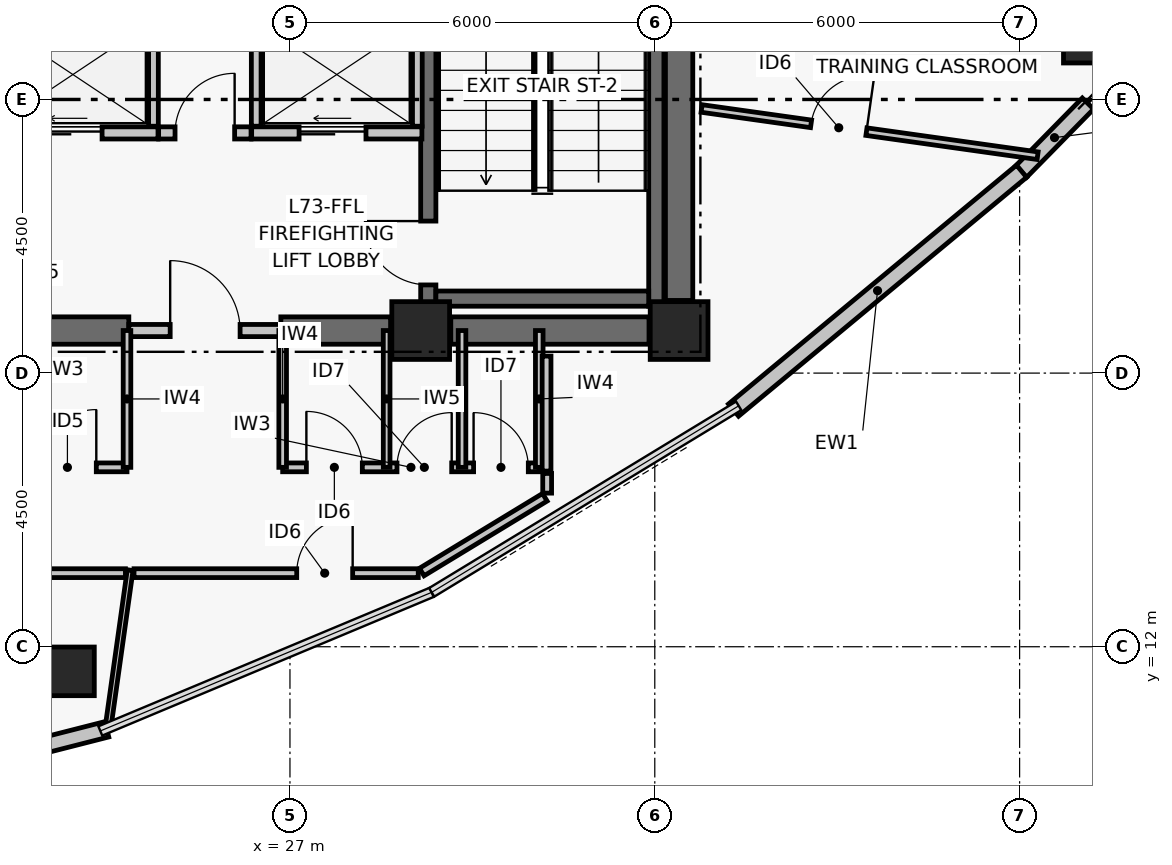
"""IFC4 building model, lengths in metres.
Left out: names, types, materials, properties, quantities, classifications, styles, units other than length and angle.
Written with IfcOpenShell. Run it as: python <this file> out.ifc"""

import sys

from ifc_helpers import new_model, si_unit, direction, frame, frame_2d, origin, origin_2d, place, context, subcontext, project, spatial, rectangle, hollow_rectangle, extrude, element, fill, save


model = new_model("IFC4")
c1 = context("Model", 3, precision=1e-05, world=origin(), true_north=direction((0.0, 1.0)))
c2 = subcontext(c1, "Body", "Model", "MODEL_VIEW")
j1 = project(units=[si_unit("LENGTHUNIT", "METRE"), si_unit("PLANEANGLEUNIT", "RADIAN")], contexts=[c1])
p1 = place(None, origin())
s1 = spatial("IfcSite", under=j1, at=p1, CompositionType="ELEMENT")
p2 = place(p1, origin())
s2 = spatial("IfcBuilding", under=s1, at=p2, CompositionType="ELEMENT")
p3 = place(p2, frame((0.0, 0.0, 288.06)))
s3 = spatial("IfcBuildingStorey", under=s2, at=p3, CompositionType="ELEMENT", Elevation=288.06)
for number, where, z_axis, x_axis in (
    (1, (29.15, 17.2, 0.0), (0.0, 0.0, 1.0), (1.0, 0.0, 0.0)),
    (2, (33.4, 17.2, 0.0), (0.0, 0.0, 1.0), (1.0, 0.0, 0.0)),
):
    element("IfcColumn", number, at=place(p3, frame(where, z_axis=z_axis, x_axis=x_axis)), inside=s3, PredefinedType="COLUMN", context=c2, shape_type="SweptSolid", body=[
        extrude(rectangle(XDim=0.95, YDim=0.95, at=origin_2d()), origin(), (0.0, 0.0, 1.0), 3.72),
    ])
p4 = place(p3, frame((22.545, 17.2, 0.0), z_axis=(0.0, 0.0, 1.0), x_axis=(1.0, 0.0, 0.0)))
e3 = element("IfcWall", 3, at=p4, inside=s3, PredefinedType="SHEAR", context=c2, shape_type="SweptSolid", body=[
    extrude(rectangle(XDim=1.805, YDim=0.45, at=frame_2d((0.903, 0.0))), origin(), (0.0, 0.0, 1.0), 3.5),
])
p5 = place(p3, frame((26.85, 17.2, 0.0), z_axis=(0.0, 0.0, 1.0), x_axis=(1.0, 0.0, 0.0)))
e4 = element("IfcWall", 4, at=p5, inside=s3, PredefinedType="SHEAR", context=c2, shape_type="SweptSolid", body=[
    extrude(rectangle(XDim=1.805, YDim=0.45, at=frame_2d((0.902, 0.0))), origin(), (0.0, 0.0, 1.0), 3.5),
])
p6 = place(p3, frame((29.645, 17.2, 0.0), z_axis=(0.0, 0.0, 1.0), x_axis=(1.0, 0.0, 0.0)))
e5 = element("IfcWall", 5, at=p6, inside=s3, PredefinedType="SHEAR", context=c2, shape_type="SweptSolid", body=[
    extrude(rectangle(XDim=3.26, YDim=0.45, at=frame_2d((1.63, 0.0))), origin(), (0.0, 0.0, 1.0), 3.5),
])
p7 = place(p3, frame((33.4, 17.695, 0.0), z_axis=(0.0, 0.0, 1.0), x_axis=(0.0, 1.0, 0.0)))
e6 = element("IfcWall", 6, at=p7, inside=s3, PredefinedType="SHEAR", context=c2, shape_type="SweptSolid", body=[
    extrude(rectangle(XDim=8.61, YDim=0.45, at=frame_2d((4.305, 0.0))), origin(), (0.0, 0.0, 1.0), 3.5),
])
p8 = place(p3, frame((29.275, 17.6, 0.0), z_axis=(0.0, 0.0, 1.0), x_axis=(0.0, 1.0, 0.0)))
e7 = element("IfcWall", 7, at=p8, inside=s3, PredefinedType="SHEAR", context=c2, shape_type="SweptSolid", body=[
    extrude(rectangle(XDim=8.8, YDim=0.25, at=frame_2d((4.4, 0.0))), origin(), (0.0, 0.0, 1.0), 3.5),
])
p9 = place(p8, frame((0.35, 0.0, 0.0)))
e8 = element("IfcOpeningElement", 8, at=p9, cuts=e7, PredefinedType="OPENING", context=c2, shape_type="SweptSolid", body=[
    extrude(rectangle(XDim=1.05, YDim=2.08, at=frame_2d((0.525, 1.04))), frame((0.0, 0.135, 0.0), z_axis=(0.0, -1.0, 0.0), x_axis=(1.0, 0.0, 0.0)), (0.0, 0.0, 1.0), 0.27),
])
p10 = place(p3, frame((33.025, 17.6, 0.0), z_axis=(0.0, 0.0, 1.0), x_axis=(0.0, 1.0, 0.0)))
e9 = element("IfcWall", 9, at=p10, inside=s3, PredefinedType="SHEAR", context=c2, shape_type="SweptSolid", body=[
    extrude(rectangle(XDim=8.8, YDim=0.25, at=frame_2d((4.4, 0.0))), origin(), (0.0, 0.0, 1.0), 3.5),
])
p11 = place(p3, frame((29.4, 17.725, 0.0), z_axis=(0.0, 0.0, 1.0), x_axis=(1.0, 0.0, 0.0)))
e10 = element("IfcWall", 10, at=p11, inside=s3, PredefinedType="SHEAR", context=c2, shape_type="SweptSolid", body=[
    extrude(rectangle(XDim=3.5, YDim=0.25, at=frame_2d((1.75, 0.0))), origin(), (0.0, 0.0, 1.0), 3.5),
])
for number, where, z_axis, x_axis in (
    (11, (40.122, 22.0, 0.0), (0.0, 0.0, 1.0), (1.0, 0.0, 0.0)),
    (12, (23.382, 11.595, 0.0), (0.0, 0.0, 1.0), (1.0, 0.0, 0.0)),
):
    element("IfcColumn", number, at=place(p3, frame(where, z_axis=z_axis, x_axis=x_axis)), inside=s3, PredefinedType="COLUMN", context=c2, shape_type="SweptSolid", body=[
        extrude(hollow_rectangle(XDim=0.8, YDim=0.8, WallThickness=0.035, at=origin_2d()), origin(), (0.0, 0.0, 1.0), 3.72),
    ])
p12 = place(p3, frame((40.124, 20.933, 0.0), z_axis=(0.0, 0.0, 1.0), x_axis=(-0.700470648387, -0.71368121087, 0.0)))
e13 = element("IfcWall", 13, at=p12, inside=s3, PredefinedType="PARTITIONING", context=c2, shape_type="SweptSolid", body=[
    extrude(rectangle(XDim=1.571, YDim=0.26, at=frame_2d((0.785, 0.0))), origin(), (0.0, 0.0, 1.0), 3.5),
])
p13 = place(p3, frame((23.988, 10.642, 0.0), z_axis=(0.0, 0.0, 1.0), x_axis=(-0.968988278672, -0.247106689096, 0.0)))
e14 = element("IfcWall", 14, at=p13, inside=s3, PredefinedType="PARTITIONING", context=c2, shape_type="SweptSolid", body=[
    extrude(rectangle(XDim=6.154, YDim=0.26, at=frame_2d((3.077, 0.0))), origin(), (0.0, 0.0, 1.0), 3.5),
])
p14 = place(p3, frame((39.032, 19.82, 0.0), z_axis=(0.0, 0.0, 1.0), x_axis=(-0.769779830138, -0.638309496337, 0.0)))
e15 = element("IfcWall", 15, at=p14, inside=s3, PredefinedType="PARTITIONING", context=c2, shape_type="SweptSolid", body=[
    extrude(rectangle(XDim=6.154, YDim=0.26, at=frame_2d((3.077, 0.0))), origin(), (0.0, 0.0, 1.0), 3.5),
])
p15 = place(p3, frame((24.35, 17.2, 0.0), z_axis=(0.0, 0.0, 1.0), x_axis=(1.0, 0.0, 0.0)))
e16 = element("IfcWall", 16, at=p15, inside=s3, PredefinedType="PARTITIONING", context=c2, shape_type="SweptSolid", body=[
    extrude(rectangle(XDim=2.5, YDim=0.2, at=frame_2d((1.25, 0.0))), origin(), (0.0, 0.0, 1.0), 2.63),
])
p16 = place(p15, frame((0.68, 0.0, 0.0)))
e17 = element("IfcOpeningElement", 17, at=p16, cuts=e16, PredefinedType="OPENING", context=c2, shape_type="SweptSolid", body=[
    extrude(rectangle(XDim=1.15, YDim=2.08, at=frame_2d((0.575, 1.04))), frame((0.0, 0.11, 0.0), z_axis=(0.0, -1.0, 0.0), x_axis=(1.0, 0.0, 0.0)), (0.0, 0.0, 1.0), 0.22),
])
p17 = place(p3, frame((24.84, 20.45, 0.0), z_axis=(0.0, 0.0, 1.0), x_axis=(1.0, 0.0, 0.0)))
e18 = element("IfcWall", 18, at=p17, inside=s3, PredefinedType="PARTITIONING", context=c2, shape_type="SweptSolid", body=[
    extrude(rectangle(XDim=1.52, YDim=0.2, at=frame_2d((0.76, 0.0))), origin(), (0.0, 0.0, 1.0), 3.5),
])
p18 = place(p17, frame((0.27, 0.0, 0.0)))
e19 = element("IfcOpeningElement", 19, at=p18, cuts=e18, PredefinedType="OPENING", context=c2, shape_type="SweptSolid", body=[
    extrude(rectangle(XDim=0.98, YDim=2.06, at=frame_2d((0.49, 1.03))), frame((0.0, 0.11, 0.0), z_axis=(0.0, -1.0, 0.0), x_axis=(1.0, 0.0, 0.0)), (0.0, 0.0, 1.0), 0.22),
])
p19 = place(p3, frame((22.03, 20.45, 0.0), z_axis=(0.0, 0.0, 1.0), x_axis=(1.0, 0.0, 0.0)))
e20 = element("IfcWall", 20, at=p19, inside=s3, PredefinedType="PARTITIONING", context=c2, shape_type="SweptSolid", body=[
    extrude(rectangle(XDim=2.8, YDim=0.2, at=frame_2d((1.4, 0.0))), origin(), (0.0, 0.0, 1.0), 3.5),
])
p20 = place(p19, frame((0.78, 0.0, 0.0)))
e21 = element("IfcOpeningElement", 21, at=p20, cuts=e20, PredefinedType="OPENING", context=c2, shape_type="SweptSolid", body=[
    extrude(rectangle(XDim=1.1, YDim=2.08, at=frame_2d((0.55, 1.04))), frame((0.0, 0.11, 0.0), z_axis=(0.0, -1.0, 0.0), x_axis=(1.0, 0.0, 0.0)), (0.0, 0.0, 1.0), 0.22),
])
p21 = place(p3, frame((26.37, 20.45, 0.0), z_axis=(0.0, 0.0, 1.0), x_axis=(1.0, 0.0, 0.0)))
e22 = element("IfcWall", 22, at=p21, inside=s3, PredefinedType="PARTITIONING", context=c2, shape_type="SweptSolid", body=[
    extrude(rectangle(XDim=2.8, YDim=0.2, at=frame_2d((1.4, 0.0))), origin(), (0.0, 0.0, 1.0), 3.5),
])
p22 = place(p21, frame((0.78, 0.0, 0.0)))
e23 = element("IfcOpeningElement", 23, at=p22, cuts=e22, PredefinedType="OPENING", context=c2, shape_type="SweptSolid", body=[
    extrude(rectangle(XDim=1.1, YDim=2.08, at=frame_2d((0.55, 1.04))), frame((0.0, 0.11, 0.0), z_axis=(0.0, -1.0, 0.0), x_axis=(1.0, 0.0, 0.0)), (0.0, 0.0, 1.0), 0.22),
])
p23 = place(p3, frame((24.755, 20.56, 0.0), z_axis=(0.0, 0.0, 1.0), x_axis=(0.0, 1.0, 0.0)))
e24 = element("IfcWall", 24, at=p23, inside=s3, PredefinedType="PARTITIONING", context=c2, shape_type="SweptSolid", body=[
    extrude(rectangle(XDim=1.71, YDim=0.16, at=frame_2d((0.855, 0.0))), origin(), (0.0, 0.0, 1.0), 3.5),
])
p24 = place(p3, frame((29.095, 20.56, 0.0), z_axis=(0.0, 0.0, 1.0), x_axis=(0.0, 1.0, 0.0)))
e25 = element("IfcWall", 25, at=p24, inside=s3, PredefinedType="PARTITIONING", context=c2, shape_type="SweptSolid", body=[
    extrude(rectangle(XDim=3.58, YDim=0.16, at=frame_2d((1.79, 0.0))), origin(), (0.0, 0.0, 1.0), 3.5),
])
p25 = place(p3, frame((26.445, 20.56, 0.0), z_axis=(0.0, 0.0, 1.0), x_axis=(0.0, 1.0, 0.0)))
e26 = element("IfcWall", 26, at=p25, inside=s3, PredefinedType="PARTITIONING", context=c2, shape_type="SweptSolid", body=[
    extrude(rectangle(XDim=1.71, YDim=0.16, at=frame_2d((0.855, 0.0))), origin(), (0.0, 0.0, 1.0), 3.5),
])
p26 = place(p3, frame((19.1, 14.95, 0.0), z_axis=(0.0, 0.0, 1.0), x_axis=(1.0, 0.0, 0.0)))
e27 = element("IfcWall", 27, at=p26, inside=s3, PredefinedType="PARTITIONING", context=c2, shape_type="SweptSolid", body=[
    extrude(rectangle(XDim=5.22, YDim=0.145, at=frame_2d((2.61, 0.0))), origin(), (0.0, 0.0, 1.0), 2.83),
])
p27 = place(p26, frame((0.2, 0.0, 0.0)))
e28 = element("IfcOpeningElement", 28, at=p27, cuts=e27, PredefinedType="OPENING", context=c2, shape_type="SweptSolid", body=[
    extrude(rectangle(XDim=0.9, YDim=2.02, at=frame_2d((0.45, 1.01))), frame((0.0, 0.083, 0.0), z_axis=(0.0, -1.0, 0.0), x_axis=(1.0, 0.0, 0.0)), (0.0, 0.0, 1.0), 0.165),
])
p28 = place(p26, frame((1.805, 0.0, 0.0)))
e29 = element("IfcOpeningElement", 29, at=p28, cuts=e27, PredefinedType="OPENING", context=c2, shape_type="SweptSolid", body=[
    extrude(rectangle(XDim=0.95, YDim=2.06, at=frame_2d((0.475, 1.03))), frame((0.0, 0.083, 0.0), z_axis=(0.0, -1.0, 0.0), x_axis=(1.0, 0.0, 0.0)), (0.0, 0.0, 1.0), 0.165),
])
p29 = place(p26, frame((3.765, 0.0, 0.0)))
e30 = element("IfcOpeningElement", 30, at=p29, cuts=e27, PredefinedType="OPENING", context=c2, shape_type="SweptSolid", body=[
    extrude(rectangle(XDim=0.95, YDim=2.06, at=frame_2d((0.475, 1.03))), frame((0.0, 0.083, 0.0), z_axis=(0.0, -1.0, 0.0), x_axis=(1.0, 0.0, 0.0)), (0.0, 0.0, 1.0), 0.165),
])
p30 = place(p3, frame((26.88, 14.95, 0.0), z_axis=(0.0, 0.0, 1.0), x_axis=(1.0, 0.0, 0.0)))
e31 = element("IfcWall", 31, at=p30, inside=s3, PredefinedType="PARTITIONING", context=c2, shape_type="SweptSolid", body=[
    extrude(rectangle(XDim=4.22, YDim=0.145, at=frame_2d((2.11, 0.0))), origin(), (0.0, 0.0, 1.0), 2.98),
])
p31 = place(p30, frame((0.39, 0.0, 0.0)))
e32 = element("IfcOpeningElement", 32, at=p31, cuts=e31, PredefinedType="OPENING", context=c2, shape_type="SweptSolid", body=[
    extrude(rectangle(XDim=0.92, YDim=2.05, at=frame_2d((0.46, 1.025))), frame((0.0, 0.083, 0.0), z_axis=(0.0, -1.0, 0.0), x_axis=(1.0, 0.0, 0.0)), (0.0, 0.0, 1.0), 0.165),
])
p32 = place(p30, frame((1.88, 0.0, 0.0)))
e33 = element("IfcOpeningElement", 33, at=p32, cuts=e31, PredefinedType="OPENING", context=c2, shape_type="SweptSolid", body=[
    extrude(rectangle(XDim=0.9, YDim=2.02, at=frame_2d((0.45, 1.01))), frame((0.0, 0.083, 0.0), z_axis=(0.0, -1.0, 0.0), x_axis=(1.0, 0.0, 0.0)), (0.0, 0.0, 1.0), 0.165),
])
p33 = place(p30, frame((3.14, 0.0, 0.0)))
e34 = element("IfcOpeningElement", 34, at=p33, cuts=e31, PredefinedType="OPENING", context=c2, shape_type="SweptSolid", body=[
    extrude(rectangle(XDim=0.9, YDim=2.02, at=frame_2d((0.45, 1.01))), frame((0.0, 0.083, 0.0), z_axis=(0.0, -1.0, 0.0), x_axis=(1.0, 0.0, 0.0)), (0.0, 0.0, 1.0), 0.165),
])
for number, where, z_axis, x_axis in (
    (35, (24.32, 14.95, 0.0), (0.0, 0.0, 1.0), (0.0, 1.0, 0.0)),
    (36, (26.88, 14.95, 0.0), (0.0, 0.0, 1.0), (0.0, 1.0, 0.0)),
):
    element("IfcWall", number, at=place(p3, frame(where, z_axis=z_axis, x_axis=x_axis)), inside=s3, PredefinedType="PARTITIONING", context=c2, shape_type="SweptSolid", body=[
        extrude(rectangle(XDim=2.25, YDim=0.125, at=frame_2d((1.125, 0.0))), origin(), (0.0, 0.0, 1.0), 2.63),
    ])
p34 = place(p3, frame((28.59, 14.95, 0.0), z_axis=(0.0, 0.0, 1.0), x_axis=(0.0, 1.0, 0.0)))
e37 = element("IfcWall", 37, at=p34, inside=s3, PredefinedType="PARTITIONING", context=c2, shape_type="SweptSolid", body=[
    extrude(rectangle(XDim=2.25, YDim=0.11, at=frame_2d((1.125, 0.0))), origin(), (0.0, 0.0, 1.0), 2.63),
])
for number, where, z_axis, x_axis in (
    (38, (29.83, 14.95, 0.0), (0.0, 0.0, 1.0), (0.0, 1.0, 0.0)),
    (39, (31.1, 14.95, 0.0), (0.0, 0.0, 1.0), (0.0, 1.0, 0.0)),
):
    element("IfcWall", number, at=place(p3, frame(where, z_axis=z_axis, x_axis=x_axis)), inside=s3, PredefinedType="PARTITIONING", context=c2, shape_type="SweptSolid", body=[
        extrude(rectangle(XDim=2.25, YDim=0.125, at=frame_2d((1.125, 0.0))), origin(), (0.0, 0.0, 1.0), 2.63),
    ])
p35 = place(p3, frame((17.54, 13.21, 0.0), z_axis=(0.0, 0.0, 1.0), x_axis=(1.0, 0.0, 0.0)))
e40 = element("IfcWall", 40, at=p35, inside=s3, PredefinedType="PARTITIONING", context=c2, shape_type="SweptSolid", body=[
    extrude(rectangle(XDim=6.754, YDim=0.145, at=frame_2d((3.377, 0.0))), origin(), (0.0, 0.0, 1.0), 2.83),
])
p36 = place(p35, frame((0.936, 0.0, 0.0)))
e41 = element("IfcOpeningElement", 41, at=p36, cuts=e40, PredefinedType="OPENING", context=c2, shape_type="SweptSolid", body=[
    extrude(rectangle(XDim=0.95, YDim=2.06, at=frame_2d((0.475, 1.03))), frame((0.0, 0.083, 0.0), z_axis=(0.0, -1.0, 0.0), x_axis=(1.0, 0.0, 0.0)), (0.0, 0.0, 1.0), 0.165),
])
p37 = place(p3, frame((24.435, 13.21, 0.0), z_axis=(0.0, 0.0, 1.0), x_axis=(1.0, 0.0, 0.0)))
e42 = element("IfcWall", 42, at=p37, inside=s3, PredefinedType="PARTITIONING", context=c2, shape_type="SweptSolid", body=[
    extrude(rectangle(XDim=4.675, YDim=0.145, at=frame_2d((2.337, 0.0))), origin(), (0.0, 0.0, 1.0), 2.98),
])
p38 = place(p37, frame((2.676, 0.0, 0.0)))
e43 = element("IfcOpeningElement", 43, at=p38, cuts=e42, PredefinedType="OPENING", context=c2, shape_type="SweptSolid", body=[
    extrude(rectangle(XDim=0.92, YDim=2.05, at=frame_2d((0.46, 1.025))), frame((0.0, 0.083, 0.0), z_axis=(0.0, -1.0, 0.0), x_axis=(1.0, 0.0, 0.0)), (0.0, 0.0, 1.0), 0.165),
])
p39 = place(p3, frame((29.168, 13.229, 0.0), z_axis=(0.0, 0.0, 1.0), x_axis=(0.854678044033, 0.519158396876, 0.0)))
e44 = element("IfcWall", 44, at=p39, inside=s3, PredefinedType="PARTITIONING", context=c2, shape_type="SweptSolid", body=[
    extrude(rectangle(XDim=2.368, YDim=0.145, at=frame_2d((1.184, 0.0))), origin(), (0.0, 0.0, 1.0), 3.5),
])
p40 = place(p3, frame((31.23, 14.526, 0.0), z_axis=(0.0, 0.0, 1.0), x_axis=(0.0, 1.0, 0.0)))
e45 = element("IfcWall", 45, at=p40, inside=s3, PredefinedType="PARTITIONING", context=c2, shape_type="SweptSolid", body=[
    extrude(rectangle(XDim=0.324, YDim=0.145, at=frame_2d((0.162, 0.0))), origin(), (0.0, 0.0, 1.0), 3.5),
])
p41 = place(p3, frame((31.22, 14.889, 0.0), z_axis=(0.0, 0.0, 1.0), x_axis=(0.0, 1.0, 0.0)))
e46 = element("IfcWall", 46, at=p41, inside=s3, PredefinedType="PARTITIONING", context=c2, shape_type="SweptSolid", body=[
    extrude(rectangle(XDim=1.891, YDim=0.145, at=frame_2d((0.946, 0.0))), origin(), (0.0, 0.0, 1.0), 2.63),
])
p42 = place(p3, frame((24.372, 13.26, 0.0), z_axis=(0.0, 0.0, 1.0), x_axis=(-0.139185119823, -0.990266379526, 0.0)))
e47 = element("IfcWall", 47, at=p42, inside=s3, PredefinedType="PARTITIONING", context=c2, shape_type="SweptSolid", body=[
    extrude(rectangle(XDim=2.629, YDim=0.095, at=frame_2d((1.315, 0.0))), origin(), (0.0, 0.0, 1.0), 2.98),
])
p43 = place(p3, frame((33.77, 20.852, 0.0), z_axis=(0.0, 0.0, 1.0), x_axis=(0.990268923666, -0.139167017724, 0.0)))
e48 = element("IfcWall", 48, at=p43, inside=s3, PredefinedType="PARTITIONING", context=c2, shape_type="SweptSolid", body=[
    extrude(rectangle(XDim=5.58, YDim=0.125, at=frame_2d((2.79, 0.0))), origin(), (0.0, 0.0, 1.0), 2.63),
])
p44 = place(p43, frame((1.818, 0.0, 0.0)))
e49 = element("IfcOpeningElement", 49, at=p44, cuts=e48, PredefinedType="OPENING", context=c2, shape_type="SweptSolid", body=[
    extrude(rectangle(XDim=0.92, YDim=2.05, at=frame_2d((0.46, 1.025))), frame((0.0, 0.073, 0.0), z_axis=(0.0, -1.0, 0.0), x_axis=(1.0, 0.0, 0.0)), (0.0, 0.0, 1.0), 0.145),
])
p45 = place(p9, origin())
e50 = element("IfcDoor", 50, at=p45, inside=s3, OperationType="SINGLE_SWING_RIGHT", PredefinedType="DOOR", context=c2, shape_type="SweptSolid", body=[
    extrude(rectangle(XDim=1.05, YDim=2.08, at=frame_2d((0.525, 1.04))), frame((0.0, 0.025, 0.0), z_axis=(0.0, -1.0, 0.0), x_axis=(1.0, 0.0, 0.0)), (0.0, 0.0, 1.0), 0.05),
])
fill(e8, e50)
p46 = place(p16, origin())
e51 = element("IfcDoor", 51, at=p46, inside=s3, OperationType="SINGLE_SWING_LEFT", PredefinedType="DOOR", context=c2, shape_type="SweptSolid", body=[
    extrude(rectangle(XDim=1.15, YDim=2.08, at=frame_2d((0.575, 1.04))), frame((0.0, 0.025, 0.0), z_axis=(0.0, -1.0, 0.0), x_axis=(1.0, 0.0, 0.0)), (0.0, 0.0, 1.0), 0.05),
])
fill(e17, e51)
p47 = place(p18, origin())
e52 = element("IfcDoor", 52, at=p47, inside=s3, OperationType="SINGLE_SWING_RIGHT", PredefinedType="DOOR", context=c2, shape_type="SweptSolid", body=[
    extrude(rectangle(XDim=0.98, YDim=2.06, at=frame_2d((0.49, 1.03))), frame((0.0, 0.025, 0.0), z_axis=(0.0, -1.0, 0.0), x_axis=(1.0, 0.0, 0.0)), (0.0, 0.0, 1.0), 0.05),
])
fill(e19, e52)
p48 = place(p20, origin())
e53 = element("IfcDoor", 53, at=p48, inside=s3, OperationType="DOUBLE_DOOR_SLIDING", PredefinedType="DOOR", context=c2, shape_type="SweptSolid", body=[
    extrude(rectangle(XDim=1.1, YDim=2.08, at=frame_2d((0.55, 1.04))), frame((0.0, 0.025, 0.0), z_axis=(0.0, -1.0, 0.0), x_axis=(1.0, 0.0, 0.0)), (0.0, 0.0, 1.0), 0.05),
])
fill(e21, e53)
p49 = place(p22, origin())
e54 = element("IfcDoor", 54, at=p49, inside=s3, OperationType="DOUBLE_DOOR_SLIDING", PredefinedType="DOOR", context=c2, shape_type="SweptSolid", body=[
    extrude(rectangle(XDim=1.1, YDim=2.08, at=frame_2d((0.55, 1.04))), frame((0.0, 0.025, 0.0), z_axis=(0.0, -1.0, 0.0), x_axis=(1.0, 0.0, 0.0)), (0.0, 0.0, 1.0), 0.05),
])
fill(e23, e54)
p50 = place(p29, origin())
e55 = element("IfcDoor", 55, at=p50, inside=s3, OperationType="SINGLE_SWING_RIGHT", PredefinedType="DOOR", context=c2, shape_type="SweptSolid", body=[
    extrude(rectangle(XDim=0.95, YDim=2.06, at=frame_2d((0.475, 1.03))), frame((0.0, 0.025, 0.0), z_axis=(0.0, -1.0, 0.0), x_axis=(1.0, 0.0, 0.0)), (0.0, 0.0, 1.0), 0.05),
])
fill(e30, e55)
p51 = place(p31, origin())
e56 = element("IfcDoor", 56, at=p51, inside=s3, OperationType="SINGLE_SWING_LEFT", PredefinedType="DOOR", context=c2, shape_type="SweptSolid", body=[
    extrude(rectangle(XDim=0.92, YDim=2.05, at=frame_2d((0.46, 1.025))), frame((0.0, 0.025, 0.0), z_axis=(0.0, -1.0, 0.0), x_axis=(1.0, 0.0, 0.0)), (0.0, 0.0, 1.0), 0.05),
])
fill(e32, e56)
p52 = place(p32, origin())
e57 = element("IfcDoor", 57, at=p52, inside=s3, OperationType="SINGLE_SWING_RIGHT", PredefinedType="DOOR", context=c2, shape_type="SweptSolid", body=[
    extrude(rectangle(XDim=0.9, YDim=2.02, at=frame_2d((0.45, 1.01))), frame((0.0, 0.025, 0.0), z_axis=(0.0, -1.0, 0.0), x_axis=(1.0, 0.0, 0.0)), (0.0, 0.0, 1.0), 0.05),
])
fill(e33, e57)
p53 = place(p33, origin())
e58 = element("IfcDoor", 58, at=p53, inside=s3, OperationType="SINGLE_SWING_LEFT", PredefinedType="DOOR", context=c2, shape_type="SweptSolid", body=[
    extrude(rectangle(XDim=0.9, YDim=2.02, at=frame_2d((0.45, 1.01))), frame((0.0, 0.025, 0.0), z_axis=(0.0, -1.0, 0.0), x_axis=(1.0, 0.0, 0.0)), (0.0, 0.0, 1.0), 0.05),
])
fill(e34, e58)
p54 = place(p38, origin())
e59 = element("IfcDoor", 59, at=p54, inside=s3, OperationType="SINGLE_SWING_RIGHT", PredefinedType="DOOR", context=c2, shape_type="SweptSolid", body=[
    extrude(rectangle(XDim=0.92, YDim=2.05, at=frame_2d((0.46, 1.025))), frame((0.0, 0.025, 0.0), z_axis=(0.0, -1.0, 0.0), x_axis=(1.0, 0.0, 0.0)), (0.0, 0.0, 1.0), 0.05),
])
fill(e43, e59)
p55 = place(p44, origin())
e60 = element("IfcDoor", 60, at=p55, inside=s3, OperationType="SINGLE_SWING_RIGHT", PredefinedType="DOOR", context=c2, shape_type="SweptSolid", body=[
    extrude(rectangle(XDim=0.92, YDim=2.05, at=frame_2d((0.46, 1.025))), frame((0.0, 0.025, 0.0), z_axis=(0.0, -1.0, 0.0), x_axis=(1.0, 0.0, 0.0)), (0.0, 0.0, 1.0), 0.05),
])
fill(e49, e60)
save(model, sys.argv[1])
